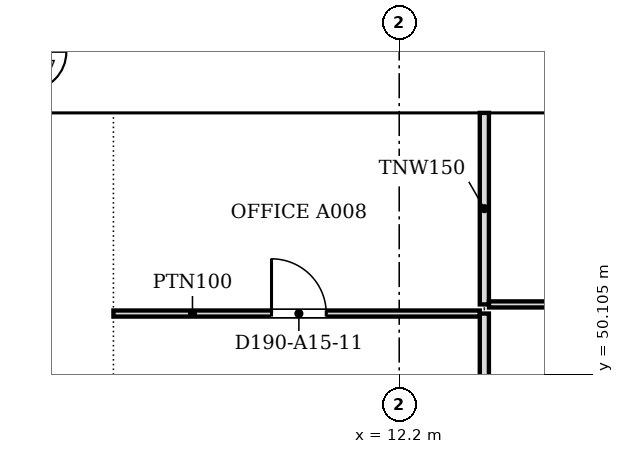
"""IFC4 building model, lengths in metres.
Left out: names, types, materials, properties, quantities, classifications, styles, units other than length and angle.
Written with IfcOpenShell. Run it as: python <this file> out.ifc"""

import sys

from ifc_helpers import new_model, si_unit, direction, frame, frame_2d, origin, place, context, subcontext, project, spatial, polyline, rectangle, outline, extrude, faceted_brep, source, transform, mapped, element, fill, save


model = new_model("IFC4")
c1 = context("Model", 3, precision=1e-05, world=origin(), true_north=direction((0.0, 1.0)))
c2 = subcontext(c1, "Body", "Model", "MODEL_VIEW")
j1 = project(units=[si_unit("LENGTHUNIT", "METRE"), si_unit("PLANEANGLEUNIT", "RADIAN")], contexts=[c1])
p1 = place(None, origin())
s1 = spatial("IfcSite", under=j1, at=p1, CompositionType="ELEMENT")
p2 = place(p1, origin())
s2 = spatial("IfcBuilding", under=s1, at=p2, CompositionType="ELEMENT")
p3 = place(p2, frame((0.0, 0.0, 166.8)))
s3 = spatial("IfcBuildingStorey", under=s2, at=p3, CompositionType="ELEMENT", Elevation=166.8)
m1 = source(origin(), c2, "Body", "SweptSolid", [
    extrude(outline(polyline([(3.05, 0.0), (6.1, 3.8), (3.05, 7.6), (0.0, 3.8), (3.05, 0.0)])), frame((0.0, 0.25, 0.0), z_axis=(0.0, -1.0, 0.0), x_axis=(1.0, 0.0, 0.0)), (0.0, 0.0, 1.0), 0.5),
])
p4 = place(p3, frame((18.3, 54.65, -3.8), z_axis=(0.0, 0.0, 1.0), x_axis=(-1.0, 0.0, 0.0)))
e1 = element("IfcWall", 1, at=p4, inside=s3, PredefinedType="SOLIDWALL", context=c2, shape_type="MappedRepresentation", body=[
    mapped(m1, transform((0.0, 0.0, 0.0), scale=1.0)),
])
m2 = source(origin(), c2, "Body", "SweptSolid", [
    extrude(outline(polyline([(3.05, 0.399), (5.78, 3.8), (3.05, 7.201), (0.321, 3.8), (3.05, 0.399)])), frame((0.0, 0.26, 0.0), z_axis=(0.0, -1.0, 0.0), x_axis=(1.0, 0.0, 0.0)), (0.0, 0.0, 1.0), 0.52),
])
p5 = place(p4, origin())
e2 = element("IfcOpeningElement", 2, at=p5, cuts=e1, PredefinedType="OPENING", context=c2, shape_type="MappedRepresentation", body=[
    mapped(m2, transform((0.0, 0.0, 0.0), scale=1.0)),
])
m3 = source(origin(), c2, "Body", "Brep", [
    faceted_brep([(3.05, -0.25, 0.0), (6.053, -0.25, 3.8), (3.05, -0.25, 7.6), (0.0, -0.25, 3.8), (0.0, 0.25, 3.8), (3.05, 0.25, 7.6), (6.007, 0.25, 3.859), (6.007, 0.25, 3.741), (3.05, 0.25, 0.0), (6.053, 0.0, 3.8)], [[[0, 1, 2, 3]], [[4, 5, 6, 7, 8]], [[8, 7, 9, 1, 0]], [[6, 5, 2, 1, 9]], [[5, 4, 3, 2]], [[4, 8, 0, 3]], [[9, 7, 6]]]),
])
p6 = place(p3, frame((12.2, 54.65, -3.8), z_axis=(0.0, 0.0, 1.0), x_axis=(-1.0, 0.0, 0.0)))
e3 = element("IfcWall", 3, at=p6, inside=s3, PredefinedType="SOLIDWALL", context=c2, shape_type="MappedRepresentation", body=[
    mapped(m3, transform((0.0, 0.0, 0.0), scale=1.0)),
])
m4 = source(origin(), c2, "Body", "SweptSolid", [
    extrude(outline(polyline([(3.049, 0.401), (5.735, 3.8), (3.049, 7.199), (0.321, 3.8), (3.049, 0.401)])), frame((0.0, 0.26, 0.0), z_axis=(0.0, -1.0, 0.0), x_axis=(1.0, 0.0, 0.0)), (0.0, 0.0, 1.0), 0.52),
])
p7 = place(p6, origin())
e4 = element("IfcOpeningElement", 4, at=p7, cuts=e3, PredefinedType="OPENING", context=c2, shape_type="MappedRepresentation", body=[
    mapped(m4, transform((0.0, 0.0, 0.0), scale=1.0)),
])
p8 = place(p2, frame((0.0, 0.0, 170.6)))
s4 = spatial("IfcBuildingStorey", under=s2, at=p8, CompositionType="ELEMENT", Elevation=170.6)
m5 = source(origin(), c2, "Body", "SweptSolid", [
    extrude(outline(polyline([(3.05, 0.0), (6.1, 3.8), (3.05, 7.6), (0.0, 3.8), (3.05, 0.0)])), frame((0.0, 0.25, 0.0), z_axis=(0.0, -1.0, 0.0), x_axis=(1.0, 0.0, 0.0)), (0.0, 0.0, 1.0), 0.5),
])
p9 = place(p8, frame((15.25, 54.65, -3.8), z_axis=(0.0, 0.0, 1.0), x_axis=(-1.0, 0.0, 0.0)))
e5 = element("IfcWall", 5, at=p9, inside=s4, PredefinedType="SOLIDWALL", context=c2, shape_type="MappedRepresentation", body=[
    mapped(m5, transform((0.0, 0.0, 0.0), scale=1.0)),
])
m6 = source(origin(), c2, "Body", "SweptSolid", [
    extrude(outline(polyline([(3.05, 0.399), (5.78, 3.8), (3.05, 7.2), (0.321, 3.8), (3.05, 0.399)])), frame((0.0, 0.26, 0.0), z_axis=(0.0, -1.0, 0.0), x_axis=(1.0, 0.0, 0.0)), (0.0, 0.0, 1.0), 0.52),
])
p10 = place(p9, origin())
e6 = element("IfcOpeningElement", 6, at=p10, cuts=e5, PredefinedType="OPENING", context=c2, shape_type="MappedRepresentation", body=[
    mapped(m6, transform((0.0, 0.0, 0.0), scale=1.0)),
])
m7 = source(origin(), c2, "Body", "Brep", [
    faceted_brep([(3.003, -0.25, 0.0), (3.05, -0.25, 0.06), (3.05, -0.25, 7.54), (3.003, -0.25, 7.6), (0.0, -0.25, 3.8), (0.0, 0.25, 3.8), (2.957, 0.25, 7.541), (2.957, 0.25, 0.059), (3.003, 0.0, 0.0), (3.003, 0.0, 7.6)], [[[0, 1, 2, 3, 4]], [[5, 6, 7]], [[1, 0, 8]], [[9, 3, 2]], [[6, 5, 4, 3, 9]], [[5, 7, 8, 0, 4]], [[1, 8, 7, 6, 9, 2]]]),
])
p11 = place(p8, frame((9.15, 54.65, -3.8), z_axis=(0.0, 0.0, 1.0), x_axis=(-1.0, 0.0, 0.0)))
e7 = element("IfcWall", 7, at=p11, inside=s4, PredefinedType="SOLIDWALL", context=c2, shape_type="MappedRepresentation", body=[
    mapped(m7, transform((0.0, 0.0, 0.0), scale=1.0)),
])
m8 = source(origin(), c2, "Body", "SweptSolid", [
    extrude(outline(polyline([(2.803, 6.944), (0.319, 3.8), (2.803, 0.656), (2.803, 6.944)])), frame((0.0, 0.26, 0.0), z_axis=(0.0, -1.0, 0.0), x_axis=(1.0, 0.0, 0.0)), (0.0, 0.0, 1.0), 0.52),
])
p12 = place(p11, origin())
e8 = element("IfcOpeningElement", 8, at=p12, cuts=e7, PredefinedType="OPENING", context=c2, shape_type="MappedRepresentation", body=[
    mapped(m8, transform((0.0, 0.0, 0.0), scale=1.0)),
])
p13 = place(p3, frame((13.6, 48.176, 0.0), z_axis=(0.0, 0.0, 1.0), x_axis=(0.0, 1.0, 0.0)))
e9 = element("IfcWall", 9, at=p13, inside=s3, PredefinedType="PARTITIONING", context=c2, shape_type="SweptSolid", body=[
    extrude(rectangle(XDim=2.924, YDim=0.15, at=frame_2d((1.462, 0.0))), origin(), (0.0, 0.0, 1.0), 3.067),
])
p14 = place(p3, frame((7.5, 51.1, 0.0), z_axis=(0.0, 0.0, 1.0), x_axis=(1.0, 0.0, 0.0)))
e10 = element("IfcWall", 10, at=p14, inside=s3, PredefinedType="PARTITIONING", context=c2, shape_type="SweptSolid", body=[
    extrude(rectangle(XDim=6.024, YDim=0.1, at=frame_2d((3.012, 0.0))), origin(), (0.0, 0.0, 1.0), 3.067),
])
m9 = source(origin(), c2, "Body", "SweptSolid", [
    extrude(rectangle(XDim=0.9, YDim=2.1, at=frame_2d((0.45, 1.05))), frame((0.0, 0.06, 0.0), z_axis=(0.0, -1.0, 0.0), x_axis=(1.0, 0.0, 0.0)), (0.0, 0.0, 1.0), 0.12),
])
p15 = place(p14, frame((2.6, 0.0, 0.0)))
e11 = element("IfcOpeningElement", 11, at=p15, cuts=e10, PredefinedType="OPENING", context=c2, shape_type="MappedRepresentation", body=[
    mapped(m9, transform((0.0, 0.0, 0.0), scale=1.0)),
])
p16 = place(p3, frame((13.6, 51.25, 0.0), z_axis=(0.0, 0.0, 1.0), x_axis=(0.0, 1.0, 0.0)))
e12 = element("IfcWall", 12, at=p16, inside=s3, PredefinedType="PARTITIONING", context=c2, shape_type="SweptSolid", body=[
    extrude(rectangle(XDim=3.15, YDim=0.15, at=frame_2d((1.575, 0.0))), origin(), (0.0, 0.0, 1.0), 3.067),
])
p17 = place(p3, frame((13.676, 51.25, 0.0), z_axis=(0.0, 0.0, 1.0), x_axis=(1.0, 0.0, 0.0)))
e13 = element("IfcWall", 13, at=p17, inside=s3, PredefinedType="PARTITIONING", context=c2, shape_type="SweptSolid", body=[
    extrude(rectangle(XDim=5.948, YDim=0.1, at=frame_2d((2.974, 0.0))), origin(), (0.0, 0.0, 1.0), 3.067),
])
p18 = place(p17, frame((2.5, 0.0, 0.0)))
e14 = element("IfcOpeningElement", 14, at=p18, cuts=e13, PredefinedType="OPENING", context=c2, shape_type="MappedRepresentation", body=[
    mapped(m9, transform((0.0, 0.0, 0.0), scale=1.0)),
])
m10 = source(origin(), c2, "Body", "SweptSolid", [
    extrude(rectangle(XDim=0.9, YDim=2.1, at=frame_2d((0.45, 1.05))), frame((0.0, 0.025, 0.0), z_axis=(0.0, -1.0, 0.0), x_axis=(1.0, 0.0, 0.0)), (0.0, 0.0, 1.0), 0.05),
])
p19 = place(p15, origin())
e15 = element("IfcDoor", 15, at=p19, inside=s3, OperationType="SINGLE_SWING_LEFT", PredefinedType="DOOR", context=c2, shape_type="MappedRepresentation", body=[
    mapped(m10, transform((0.0, 0.0, 0.0), scale=1.0)),
])
fill(e11, e15)
save(model, sys.argv[1])
